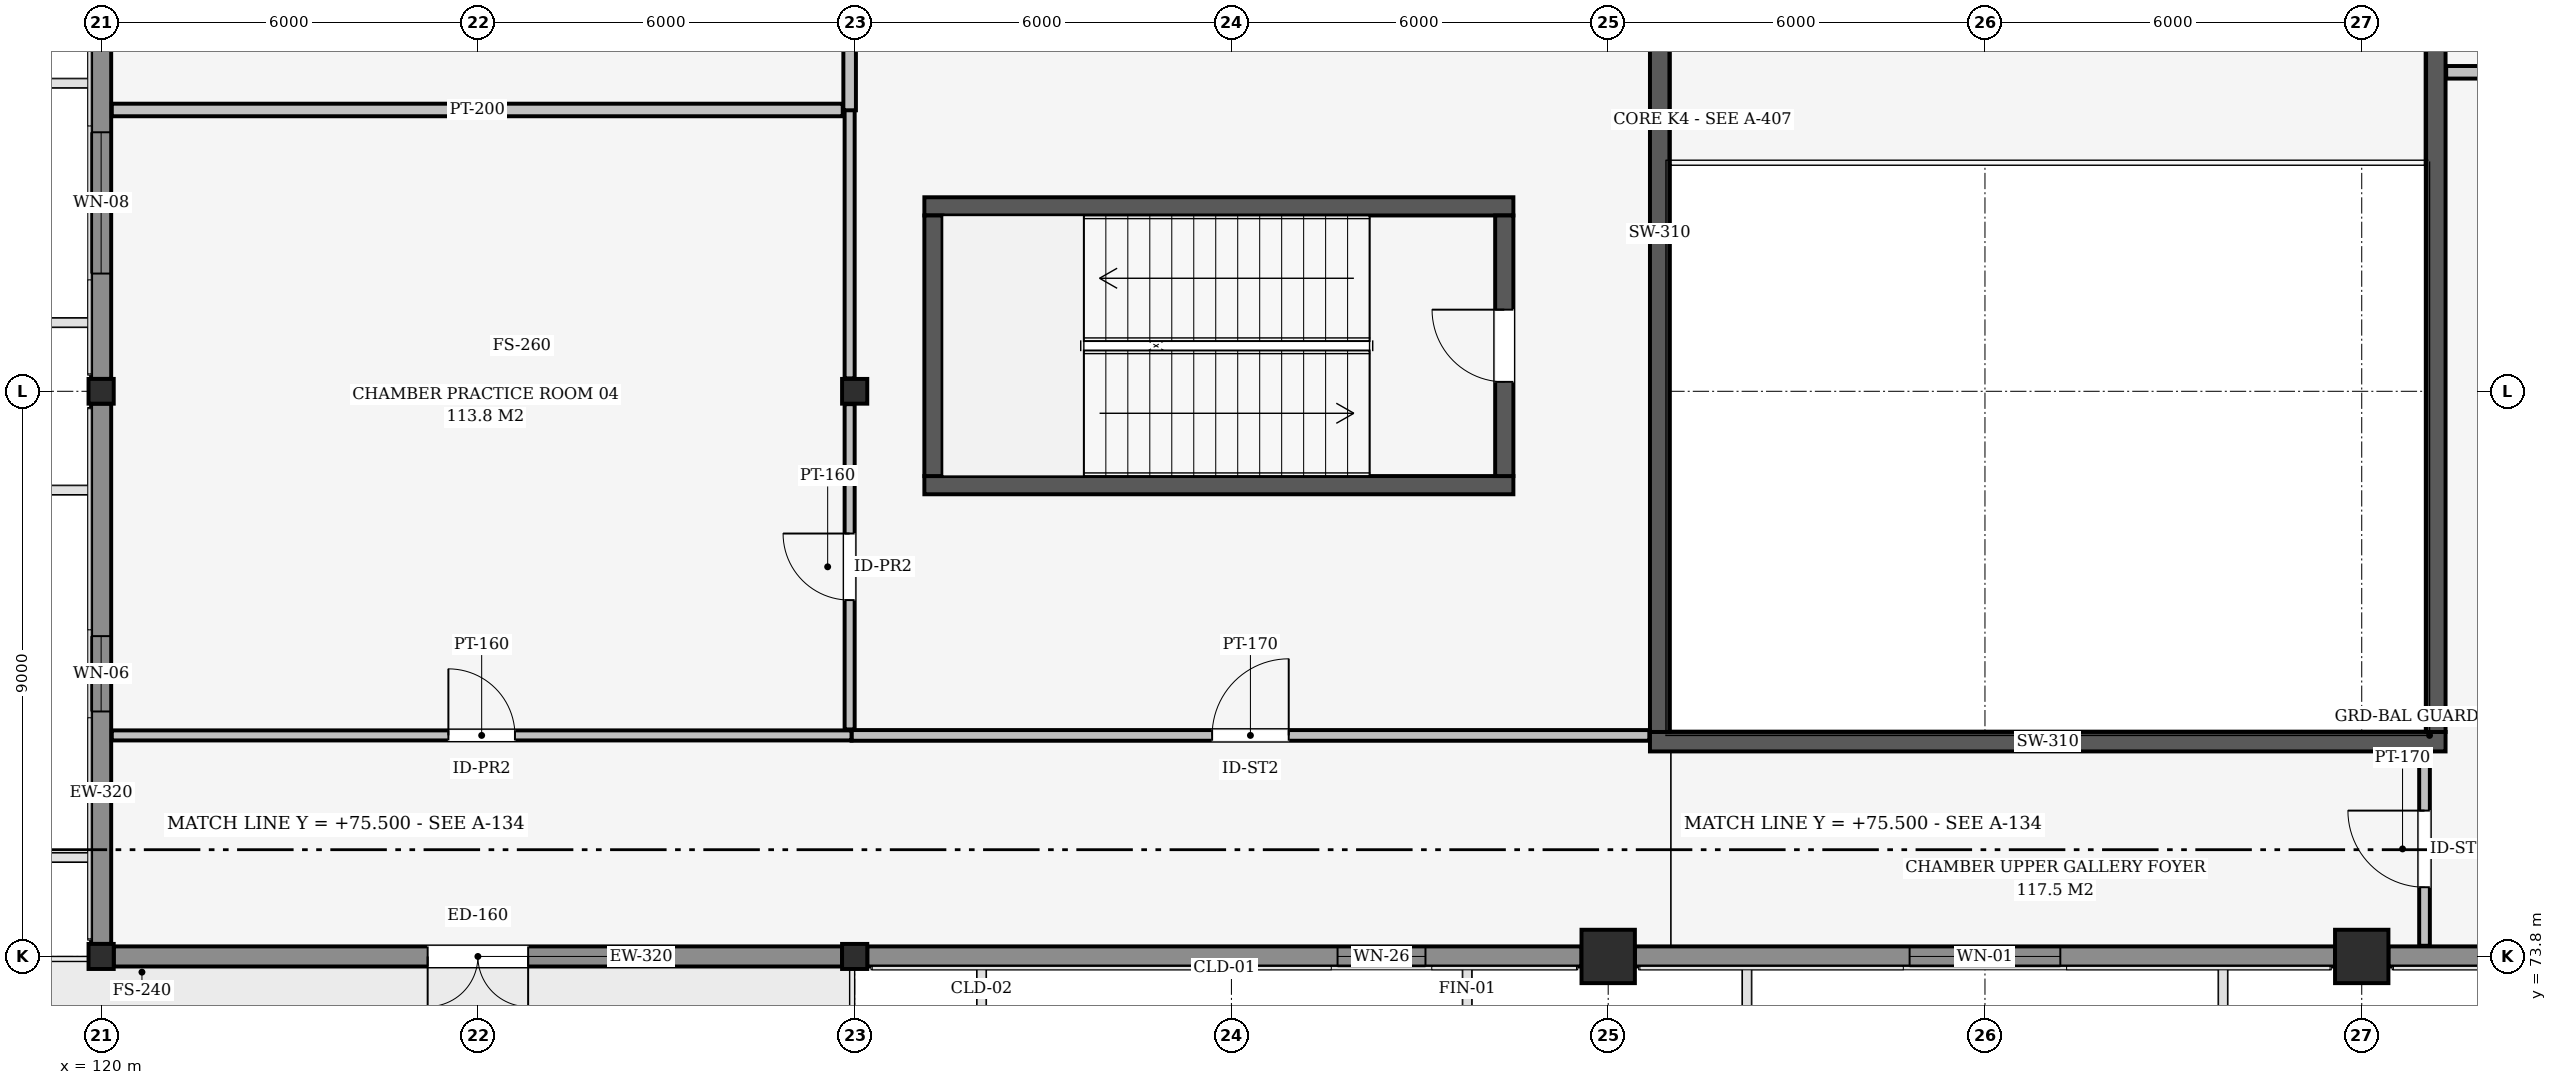
"""IFC4 building model, lengths in metres.
Left out: names, types, materials, properties, quantities, classifications, styles, units other than length and angle.
Written with IfcOpenShell. Run it as: python <this file> out.ifc"""

import sys

from ifc_helpers import new_model, si_unit, direction, frame, frame_2d, origin, origin_2d, place, context, subcontext, project, spatial, rectangle, i_section, extrude, element, fill, save


model = new_model("IFC4")
c1 = context("Model", 3, precision=1e-05, world=origin(), true_north=direction((0.0, 1.0)))
c2 = subcontext(c1, "Body", "Model", "MODEL_VIEW")
j1 = project(units=[si_unit("LENGTHUNIT", "METRE"), si_unit("PLANEANGLEUNIT", "RADIAN")], contexts=[c1])
p1 = place(None, origin())
s1 = spatial("IfcSite", under=j1, at=p1, CompositionType="ELEMENT")
p2 = place(p1, origin())
s2 = spatial("IfcBuilding", under=s1, at=p2, CompositionType="ELEMENT")
p3 = place(p2, frame((0.0, 0.0, 9.3)))
s3 = spatial("IfcBuildingStorey", under=s2, at=p3, CompositionType="ELEMENT", Elevation=9.3)
p4 = place(p3, frame((120.0, 73.8, 0.0), z_axis=(0.0, 0.0, 1.0), x_axis=(1.0, 0.0, 0.0)))
e1 = element("IfcColumn", 1, at=p4, inside=s3, PredefinedType="COLUMN", context=c2, shape_type="SweptSolid", body=[
    extrude(i_section(OverallWidth=0.401, OverallDepth=0.399, WebThickness=0.025, FlangeThickness=0.04, at=origin_2d()), origin(), (0.0, 0.0, 1.0), 4.5),
])
p5 = place(p3, frame((120.0, 82.8, 0.0), z_axis=(0.0, 0.0, 1.0), x_axis=(1.0, 0.0, 0.0)))
e2 = element("IfcColumn", 2, at=p5, inside=s3, PredefinedType="COLUMN", context=c2, shape_type="SweptSolid", body=[
    extrude(i_section(OverallWidth=0.401, OverallDepth=0.394, WebThickness=0.023, FlangeThickness=0.037, at=origin_2d()), origin(), (0.0, 0.0, 1.0), 4.5),
])
p6 = place(p3, frame((132.0, 73.8, 0.0), z_axis=(0.0, 0.0, 1.0), x_axis=(1.0, 0.0, 0.0)))
e3 = element("IfcColumn", 3, at=p6, inside=s3, PredefinedType="COLUMN", context=c2, shape_type="SweptSolid", body=[
    extrude(i_section(OverallWidth=0.401, OverallDepth=0.399, WebThickness=0.025, FlangeThickness=0.04, at=origin_2d()), origin(), (0.0, 0.0, 1.0), 4.5),
])
p7 = place(p3, frame((132.0, 82.8, 0.0), z_axis=(0.0, 0.0, 1.0), x_axis=(1.0, 0.0, 0.0)))
e4 = element("IfcColumn", 4, at=p7, inside=s3, PredefinedType="COLUMN", context=c2, shape_type="SweptSolid", body=[
    extrude(i_section(OverallWidth=0.401, OverallDepth=0.394, WebThickness=0.023, FlangeThickness=0.037, at=origin_2d()), origin(), (0.0, 0.0, 1.0), 4.5),
])
for number, where, z_axis, x_axis in (
    (5, (144.0, 73.8, 0.0), (0.0, 0.0, 1.0), (1.0, 0.0, 0.0)),
    (6, (156.0, 73.8, 0.0), (0.0, 0.0, 1.0), (1.0, 0.0, 0.0)),
):
    element("IfcColumn", number, at=place(p3, frame(where, z_axis=z_axis, x_axis=x_axis)), inside=s3, PredefinedType="COLUMN", context=c2, shape_type="SweptSolid", body=[
        extrude(rectangle(XDim=0.85, YDim=0.85, at=origin_2d()), origin(), (0.0, 0.0, 1.0), 4.5),
    ])
p8 = place(p3, frame((144.665, 77.22, 0.0), z_axis=(0.0, 0.0, 1.0), x_axis=(1.0, 0.0, 0.0)))
e7 = element("IfcWall", 7, at=p8, inside=s3, PredefinedType="SHEAR", context=c2, shape_type="SweptSolid", body=[
    extrude(rectangle(XDim=12.67, YDim=0.31, at=frame_2d((6.335, 0.0))), origin(), (0.0, 0.0, 1.0), 2.71),
])
p9 = place(p3, frame((144.82, 77.375, 0.0), z_axis=(0.0, 0.0, 1.0), x_axis=(0.0, 1.0, 0.0)))
e8 = element("IfcWall", 8, at=p9, inside=s3, PredefinedType="SHEAR", context=c2, shape_type="SweptSolid", body=[
    extrude(rectangle(XDim=15.89, YDim=0.31, at=frame_2d((7.945, 0.0))), origin(), (0.0, 0.0, 1.0), 4.22),
])
p10 = place(p9, frame((12.818, 0.0, 0.0)))
e9 = element("IfcOpeningElement", 9, at=p10, cuts=e8, PredefinedType="OPENING", context=c2, shape_type="SweptSolid", body=[
    extrude(rectangle(XDim=0.96, YDim=2.16, at=frame_2d((0.48, 1.08))), frame((0.0, 0.165, 0.0), z_axis=(0.0, -1.0, 0.0), x_axis=(1.0, 0.0, 0.0)), (0.0, 0.0, 1.0), 0.33),
])
p11 = place(p3, frame((157.18, 77.375, 0.0), z_axis=(0.0, 0.0, 1.0), x_axis=(0.0, 1.0, 0.0)))
e10 = element("IfcWall", 10, at=p11, inside=s3, PredefinedType="SHEAR", context=c2, shape_type="SweptSolid", body=[
    extrude(rectangle(XDim=15.89, YDim=0.31, at=frame_2d((7.945, 0.0))), origin(), (0.0, 0.0, 1.0), 4.22),
])
p12 = place(p3, frame((131.8, 73.8, 0.0), z_axis=(0.0, 0.0, 1.0), x_axis=(-1.0, 0.0, 0.0)))
e11 = element("IfcWall", 11, at=p12, inside=s3, PredefinedType="SOLIDWALL", context=c2, shape_type="SweptSolid", body=[
    extrude(rectangle(XDim=11.599, YDim=0.32, at=frame_2d((5.8, 0.0))), origin(), (0.0, 0.0, 1.0), 3.388),
])
p13 = place(p12, frame((5.0, 0.0, 0.0)))
e12 = element("IfcOpeningElement", 12, at=p13, cuts=e11, PredefinedType="OPENING", context=c2, shape_type="SweptSolid", body=[
    extrude(rectangle(XDim=1.6, YDim=2.3, at=frame_2d((0.8, 1.15))), frame((0.0, 0.17, 0.0), z_axis=(0.0, -1.0, 0.0), x_axis=(1.0, 0.0, 0.0)), (0.0, 0.0, 1.0), 0.34),
])
p14 = place(p3, frame((143.575, 73.8, 0.0), z_axis=(0.0, 0.0, 1.0), x_axis=(-1.0, 0.0, 0.0)))
e13 = element("IfcWall", 13, at=p14, inside=s3, PredefinedType="SOLIDWALL", context=c2, shape_type="SweptSolid", body=[
    extrude(rectangle(XDim=11.375, YDim=0.32, at=frame_2d((5.687, 0.0))), origin(), (0.0, 0.0, 1.0), 3.664),
])
p15 = place(p14, frame((2.485, 0.0, 0.85)))
e14 = element("IfcOpeningElement", 14, at=p15, cuts=e13, PredefinedType="OPENING", context=c2, shape_type="SweptSolid", body=[
    extrude(rectangle(XDim=1.4, YDim=1.3, at=frame_2d((0.7, 0.65))), frame((0.0, 0.17, 0.0), z_axis=(0.0, -1.0, 0.0), x_axis=(1.0, 0.0, 0.0)), (0.0, 0.0, 1.0), 0.34),
])
p16 = place(p3, frame((155.575, 73.8, 0.0), z_axis=(0.0, 0.0, 1.0), x_axis=(-1.0, 0.0, 0.0)))
e15 = element("IfcWall", 15, at=p16, inside=s3, PredefinedType="SOLIDWALL", context=c2, shape_type="SweptSolid", body=[
    extrude(rectangle(XDim=11.15, YDim=0.32, at=frame_2d((5.575, 0.0))), origin(), (0.0, 0.0, 1.0), 3.664),
])
p17 = place(p16, frame((4.375, 0.0, 0.85)))
e16 = element("IfcOpeningElement", 16, at=p17, cuts=e15, PredefinedType="OPENING", context=c2, shape_type="SweptSolid", body=[
    extrude(rectangle(XDim=2.4, YDim=1.8, at=frame_2d((1.2, 0.9))), frame((0.0, 0.17, 0.0), z_axis=(0.0, -1.0, 0.0), x_axis=(1.0, 0.0, 0.0)), (0.0, 0.0, 1.0), 0.34),
])
p18 = place(p3, frame((167.575, 73.8, 0.0), z_axis=(0.0, 0.0, 1.0), x_axis=(-1.0, 0.0, 0.0)))
e17 = element("IfcWall", 17, at=p18, inside=s3, PredefinedType="SOLIDWALL", context=c2, shape_type="SweptSolid", body=[
    extrude(rectangle(XDim=11.15, YDim=0.32, at=frame_2d((5.575, 0.0))), origin(), (0.0, 0.0, 1.0), 3.664),
])
p19 = place(p18, frame((4.525, 0.0, 0.85)))
e18 = element("IfcOpeningElement", 18, at=p19, cuts=e17, PredefinedType="OPENING", context=c2, shape_type="SweptSolid", body=[
    extrude(rectangle(XDim=2.1, YDim=1.8, at=frame_2d((1.05, 0.9))), frame((0.0, 0.17, 0.0), z_axis=(0.0, -1.0, 0.0), x_axis=(1.0, 0.0, 0.0)), (0.0, 0.0, 1.0), 0.34),
])
p20 = place(p3, frame((120.0, 74.0, 0.0), z_axis=(0.0, 0.0, 1.0), x_axis=(0.0, 1.0, 0.0)))
e19 = element("IfcWall", 19, at=p20, inside=s3, PredefinedType="SOLIDWALL", context=c2, shape_type="SweptSolid", body=[
    extrude(rectangle(XDim=8.604, YDim=0.32, at=frame_2d((4.302, 0.0))), origin(), (0.0, 0.0, 1.0), 3.764),
])
p21 = place(p20, frame((3.702, 0.0, 0.85)))
e20 = element("IfcOpeningElement", 20, at=p21, cuts=e19, PredefinedType="OPENING", context=c2, shape_type="SweptSolid", body=[
    extrude(rectangle(XDim=1.2, YDim=1.5, at=frame_2d((0.6, 0.75))), frame((0.0, 0.17, 0.0), z_axis=(0.0, -1.0, 0.0), x_axis=(1.0, 0.0, 0.0)), (0.0, 0.0, 1.0), 0.34),
])
p22 = place(p3, frame((120.0, 82.997, 0.0), z_axis=(0.0, 0.0, 1.0), x_axis=(0.0, 1.0, 0.0)))
e21 = element("IfcWall", 21, at=p22, inside=s3, PredefinedType="SOLIDWALL", context=c2, shape_type="SweptSolid", body=[
    extrude(rectangle(XDim=5.606, YDim=0.32, at=frame_2d((2.803, 0.0))), origin(), (0.0, 0.0, 1.0), 3.764),
])
p23 = place(p22, frame((1.678, 0.0, 0.85)))
e22 = element("IfcOpeningElement", 22, at=p23, cuts=e21, PredefinedType="OPENING", context=c2, shape_type="SweptSolid", body=[
    extrude(rectangle(XDim=2.25, YDim=1.95, at=frame_2d((1.125, 0.975))), frame((0.0, 0.17, 0.0), z_axis=(0.0, -1.0, 0.0), x_axis=(1.0, 0.0, 0.0)), (0.0, 0.0, 1.0), 0.34),
])
for number, where, z_axis, x_axis in (
    (23, (133.11, 81.305, 0.0), (0.0, 0.0, 1.0), (1.0, 0.0, 0.0)),
    (24, (133.11, 85.745, 0.0), (0.0, 0.0, 1.0), (1.0, 0.0, 0.0)),
):
    element("IfcWall", number, at=place(p3, frame(where, z_axis=z_axis, x_axis=x_axis)), inside=s3, PredefinedType="SHEAR", context=c2, shape_type="SweptSolid", body=[
        extrude(rectangle(XDim=9.38, YDim=0.29, at=frame_2d((4.69, 0.0))), origin(), (0.0, 0.0, 1.0), 4.22),
    ])
p24 = place(p3, frame((133.255, 81.45, 0.0), z_axis=(0.0, 0.0, 1.0), x_axis=(0.0, 1.0, 0.0)))
e25 = element("IfcWall", 25, at=p24, inside=s3, PredefinedType="SHEAR", context=c2, shape_type="SweptSolid", body=[
    extrude(rectangle(XDim=4.15, YDim=0.29, at=frame_2d((2.075, 0.0))), origin(), (0.0, 0.0, 1.0), 4.22),
])
p25 = place(p3, frame((142.345, 81.45, 0.0), z_axis=(0.0, 0.0, 1.0), x_axis=(0.0, 1.0, 0.0)))
e26 = element("IfcWall", 26, at=p25, inside=s3, PredefinedType="SHEAR", context=c2, shape_type="SweptSolid", body=[
    extrude(rectangle(XDim=4.15, YDim=0.29, at=frame_2d((2.075, 0.0))), origin(), (0.0, 0.0, 1.0), 4.22),
])
p26 = place(p25, frame((1.5, 0.0, 0.0)))
e27 = element("IfcOpeningElement", 27, at=p26, cuts=e26, PredefinedType="OPENING", context=c2, shape_type="SweptSolid", body=[
    extrude(rectangle(XDim=1.15, YDim=2.15, at=frame_2d((0.575, 1.075))), frame((0.0, 0.155, 0.0), z_axis=(0.0, -1.0, 0.0), x_axis=(1.0, 0.0, 0.0)), (0.0, 0.0, 1.0), 0.31),
])
p27 = place(p3, frame((131.95, 77.32, 0.0), z_axis=(0.0, 0.0, 1.0), x_axis=(1.0, 0.0, 0.0)))
e28 = element("IfcWall", 28, at=p27, inside=s3, PredefinedType="PARTITIONING", context=c2, shape_type="SweptSolid", body=[
    extrude(rectangle(XDim=12.705, YDim=0.17, at=frame_2d((6.353, 0.0))), origin(), (0.0, 0.0, 1.0), 4.2),
])
p28 = place(p27, frame((5.742, 0.0, 0.0)))
e29 = element("IfcOpeningElement", 29, at=p28, cuts=e28, PredefinedType="OPENING", context=c2, shape_type="SweptSolid", body=[
    extrude(rectangle(XDim=1.22, YDim=2.18, at=frame_2d((0.61, 1.09))), frame((0.0, 0.095, 0.0), z_axis=(0.0, -1.0, 0.0), x_axis=(1.0, 0.0, 0.0)), (0.0, 0.0, 1.0), 0.19),
])
p29 = place(p3, frame((120.17, 77.32, 0.0), z_axis=(0.0, 0.0, 1.0), x_axis=(1.0, 0.0, 0.0)))
e30 = element("IfcWall", 30, at=p29, inside=s3, PredefinedType="PARTITIONING", context=c2, shape_type="SweptSolid", body=[
    extrude(rectangle(XDim=11.78, YDim=0.16, at=frame_2d((5.89, 0.0))), origin(), (0.0, 0.0, 1.0), 4.19),
])
p30 = place(p29, frame((5.36, 0.0, 0.0)))
e31 = element("IfcOpeningElement", 31, at=p30, cuts=e30, PredefinedType="OPENING", context=c2, shape_type="SweptSolid", body=[
    extrude(rectangle(XDim=1.06, YDim=2.22, at=frame_2d((0.53, 1.11))), frame((0.0, 0.09, 0.0), z_axis=(0.0, -1.0, 0.0), x_axis=(1.0, 0.0, 0.0)), (0.0, 0.0, 1.0), 0.18),
])
p31 = place(p3, frame((157.0, 73.97, 0.0), z_axis=(0.0, 0.0, 1.0), x_axis=(0.0, 1.0, 0.0)))
e32 = element("IfcWall", 32, at=p31, inside=s3, PredefinedType="PARTITIONING", context=c2, shape_type="SweptSolid", body=[
    extrude(rectangle(XDim=3.085, YDim=0.17, at=frame_2d((1.542, 0.0))), origin(), (0.0, 0.0, 1.0), 3.664),
])
p32 = place(p31, frame((0.933, 0.0, 0.0)))
e33 = element("IfcOpeningElement", 33, at=p32, cuts=e32, PredefinedType="OPENING", context=c2, shape_type="SweptSolid", body=[
    extrude(rectangle(XDim=1.22, YDim=2.18, at=frame_2d((0.61, 1.09))), frame((0.0, 0.095, 0.0), z_axis=(0.0, -1.0, 0.0), x_axis=(1.0, 0.0, 0.0)), (0.0, 0.0, 1.0), 0.19),
])
p33 = place(p3, frame((131.92, 77.415, 0.0), z_axis=(0.0, 0.0, 1.0), x_axis=(0.0, 1.0, 0.0)))
e34 = element("IfcWall", 34, at=p33, inside=s3, PredefinedType="PARTITIONING", context=c2, shape_type="SweptSolid", body=[
    extrude(rectangle(XDim=5.18, YDim=0.16, at=frame_2d((2.59, 0.0))), origin(), (0.0, 0.0, 1.0), 3.764),
])
p34 = place(p33, frame((2.06, 0.0, 0.0)))
e35 = element("IfcOpeningElement", 35, at=p34, cuts=e34, PredefinedType="OPENING", context=c2, shape_type="SweptSolid", body=[
    extrude(rectangle(XDim=1.06, YDim=2.22, at=frame_2d((0.53, 1.11))), frame((0.0, 0.09, 0.0), z_axis=(0.0, -1.0, 0.0), x_axis=(1.0, 0.0, 0.0)), (0.0, 0.0, 1.0), 0.18),
])
p35 = place(p3, frame((131.92, 83.005, 0.0), z_axis=(0.0, 0.0, 1.0), x_axis=(0.0, 1.0, 0.0)))
e36 = element("IfcWall", 36, at=p35, inside=s3, PredefinedType="PARTITIONING", context=c2, shape_type="SweptSolid", body=[
    extrude(rectangle(XDim=4.28, YDim=0.16, at=frame_2d((2.14, 0.0))), origin(), (0.0, 0.0, 1.0), 3.764),
])
p36 = place(p3, frame((131.92, 87.275, 0.0), z_axis=(0.0, 0.0, 1.0), x_axis=(0.0, 1.0, 0.0)))
e37 = element("IfcWall", 37, at=p36, inside=s3, PredefinedType="PARTITIONING", context=c2, shape_type="SweptSolid", body=[
    extrude(rectangle(XDim=1.32, YDim=0.2, at=frame_2d((0.66, 0.0))), origin(), (0.0, 0.0, 1.0), 3.764),
])
p37 = place(p3, frame((120.17, 87.28, 0.0), z_axis=(0.0, 0.0, 1.0), x_axis=(1.0, 0.0, 0.0)))
e38 = element("IfcWall", 38, at=p37, inside=s3, PredefinedType="PARTITIONING", context=c2, shape_type="SweptSolid", body=[
    extrude(rectangle(XDim=11.64, YDim=0.2, at=frame_2d((5.82, 0.0))), origin(), (0.0, 0.0, 1.0), 4.19),
])
p38 = place(p3, frame((157.345, 87.88, 0.0), z_axis=(0.0, 0.0, 1.0), x_axis=(1.0, 0.0, 0.0)))
e39 = element("IfcWall", 39, at=p38, inside=s3, PredefinedType="PARTITIONING", context=c2, shape_type="SweptSolid", body=[
    extrude(rectangle(XDim=7.54, YDim=0.2, at=frame_2d((3.77, 0.0))), origin(), (0.0, 0.0, 1.0), 4.2),
])
p39 = place(p38, frame((3.22, 0.0, 0.0)))
e40 = element("IfcOpeningElement", 40, at=p39, cuts=e39, PredefinedType="OPENING", context=c2, shape_type="SweptSolid", body=[
    extrude(rectangle(XDim=1.1, YDim=2.26, at=frame_2d((0.55, 1.13))), frame((0.0, 0.11, 0.0), z_axis=(0.0, -1.0, 0.0), x_axis=(1.0, 0.0, 0.0)), (0.0, 0.0, 1.0), 0.22),
])
p40 = place(p13, origin())
e41 = element("IfcDoor", 41, at=p40, inside=s3, OperationType="DOUBLE_DOOR_SINGLE_SWING", PredefinedType="DOOR", context=c2, shape_type="SweptSolid", body=[
    extrude(rectangle(XDim=1.6, YDim=2.3, at=frame_2d((0.8, 1.15))), frame((0.0, 0.025, 0.0), z_axis=(0.0, -1.0, 0.0), x_axis=(1.0, 0.0, 0.0)), (0.0, 0.0, 1.0), 0.05),
])
fill(e12, e41)
p41 = place(p15, origin())
e42 = element("IfcWindow", 42, at=p41, inside=s3, PartitioningType="SINGLE_PANEL", PredefinedType="WINDOW", context=c2, shape_type="SweptSolid", body=[
    extrude(rectangle(XDim=1.4, YDim=1.3, at=frame_2d((0.7, 0.65))), frame((0.0, 0.03, 0.0), z_axis=(0.0, -1.0, 0.0), x_axis=(1.0, 0.0, 0.0)), (0.0, 0.0, 1.0), 0.06),
])
fill(e14, e42)
p42 = place(p17, origin())
e43 = element("IfcWindow", 43, at=p42, inside=s3, PartitioningType="SINGLE_PANEL", PredefinedType="WINDOW", context=c2, shape_type="SweptSolid", body=[
    extrude(rectangle(XDim=2.4, YDim=1.8, at=frame_2d((1.2, 0.9))), frame((0.0, 0.03, 0.0), z_axis=(0.0, -1.0, 0.0), x_axis=(1.0, 0.0, 0.0)), (0.0, 0.0, 1.0), 0.06),
])
fill(e16, e43)
p43 = place(p21, origin())
e44 = element("IfcWindow", 44, at=p43, inside=s3, PartitioningType="SINGLE_PANEL", PredefinedType="WINDOW", context=c2, shape_type="SweptSolid", body=[
    extrude(rectangle(XDim=1.2, YDim=1.5, at=frame_2d((0.6, 0.75))), frame((0.0, 0.03, 0.0), z_axis=(0.0, -1.0, 0.0), x_axis=(1.0, 0.0, 0.0)), (0.0, 0.0, 1.0), 0.06),
])
fill(e20, e44)
p44 = place(p23, origin())
e45 = element("IfcWindow", 45, at=p44, inside=s3, PartitioningType="SINGLE_PANEL", PredefinedType="WINDOW", context=c2, shape_type="SweptSolid", body=[
    extrude(rectangle(XDim=2.25, YDim=1.95, at=frame_2d((1.125, 0.975))), frame((0.0, 0.03, 0.0), z_axis=(0.0, -1.0, 0.0), x_axis=(1.0, 0.0, 0.0)), (0.0, 0.0, 1.0), 0.06),
])
fill(e22, e45)
p45 = place(p26, origin())
e46 = element("IfcDoor", 46, at=p45, inside=s3, OperationType="SINGLE_SWING_RIGHT", PredefinedType="DOOR", context=c2, shape_type="SweptSolid", body=[
    extrude(rectangle(XDim=1.15, YDim=2.15, at=frame_2d((0.575, 1.075))), frame((0.0, 0.025, 0.0), z_axis=(0.0, -1.0, 0.0), x_axis=(1.0, 0.0, 0.0)), (0.0, 0.0, 1.0), 0.05),
])
fill(e27, e46)
p46 = place(p28, origin())
e47 = element("IfcDoor", 47, at=p46, inside=s3, OperationType="SINGLE_SWING_RIGHT", PredefinedType="DOOR", context=c2, shape_type="SweptSolid", body=[
    extrude(rectangle(XDim=1.22, YDim=2.18, at=frame_2d((0.61, 1.09))), frame((0.0, 0.025, 0.0), z_axis=(0.0, -1.0, 0.0), x_axis=(1.0, 0.0, 0.0)), (0.0, 0.0, 1.0), 0.05),
])
fill(e29, e47)
p47 = place(p30, origin())
e48 = element("IfcDoor", 48, at=p47, inside=s3, OperationType="SINGLE_SWING_LEFT", PredefinedType="DOOR", context=c2, shape_type="SweptSolid", body=[
    extrude(rectangle(XDim=1.06, YDim=2.22, at=frame_2d((0.53, 1.11))), frame((0.0, 0.025, 0.0), z_axis=(0.0, -1.0, 0.0), x_axis=(1.0, 0.0, 0.0)), (0.0, 0.0, 1.0), 0.05),
])
fill(e31, e48)
p48 = place(p32, origin())
e49 = element("IfcDoor", 49, at=p48, inside=s3, OperationType="SINGLE_SWING_RIGHT", PredefinedType="DOOR", context=c2, shape_type="SweptSolid", body=[
    extrude(rectangle(XDim=1.22, YDim=2.18, at=frame_2d((0.61, 1.09))), frame((0.0, 0.025, 0.0), z_axis=(0.0, -1.0, 0.0), x_axis=(1.0, 0.0, 0.0)), (0.0, 0.0, 1.0), 0.05),
])
fill(e33, e49)
p49 = place(p34, origin())
e50 = element("IfcDoor", 50, at=p49, inside=s3, OperationType="SINGLE_SWING_RIGHT", PredefinedType="DOOR", context=c2, shape_type="SweptSolid", body=[
    extrude(rectangle(XDim=1.06, YDim=2.22, at=frame_2d((0.53, 1.11))), frame((0.0, 0.025, 0.0), z_axis=(0.0, -1.0, 0.0), x_axis=(1.0, 0.0, 0.0)), (0.0, 0.0, 1.0), 0.05),
])
fill(e35, e50)
save(model, sys.argv[1])
